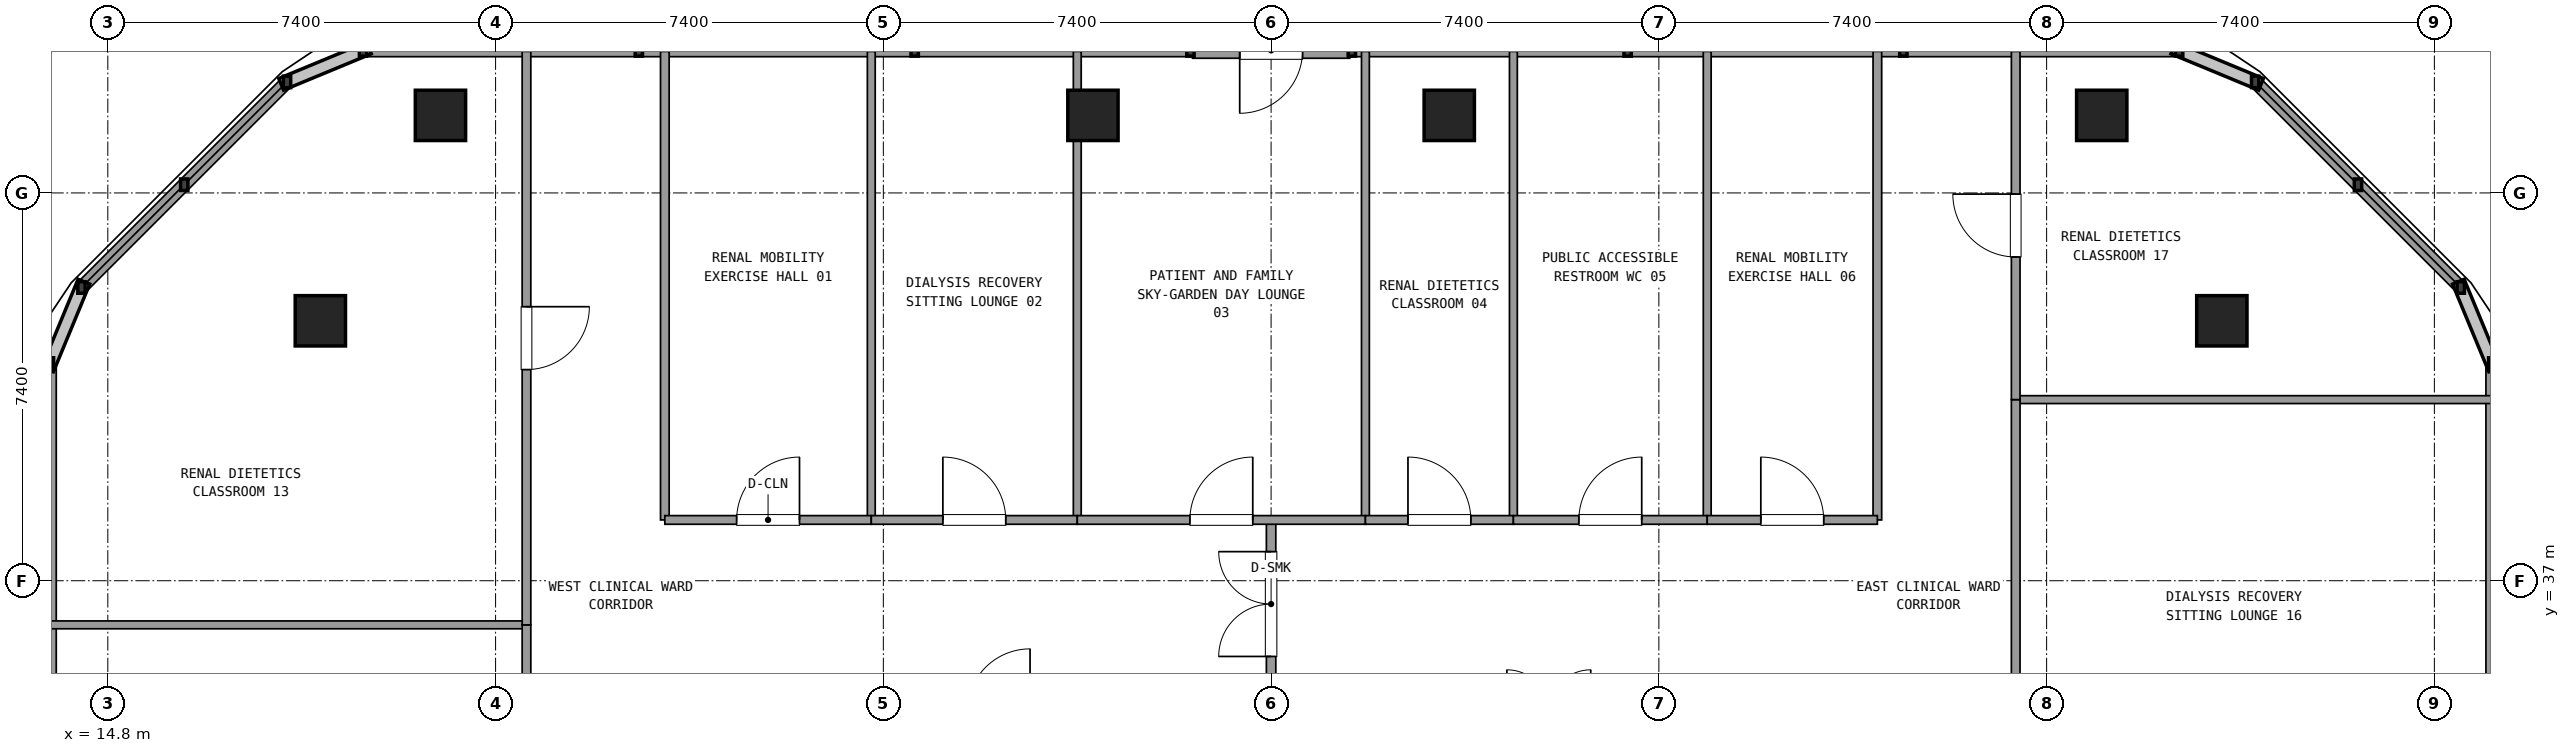
"""IFC4 building model, lengths in metres.
Left out: names, types, materials, properties, quantities, classifications, styles, units other than length and angle.
Written with IfcOpenShell. Run it as: python <this file> out.ifc"""

import sys

from ifc_helpers import new_model, si_unit, direction, frame, frame_2d, origin, origin_2d, place, context, subcontext, project, spatial, rectangle, extrude, element, fill, save


model = new_model("IFC4")
c1 = context("Model", 3, precision=1e-05, world=origin(), true_north=direction((0.0, 1.0)))
c2 = subcontext(c1, "Body", "Model", "MODEL_VIEW")
j1 = project(units=[si_unit("LENGTHUNIT", "METRE"), si_unit("PLANEANGLEUNIT", "RADIAN")], contexts=[c1])
p1 = place(None, origin())
s1 = spatial("IfcSite", under=j1, at=p1, CompositionType="ELEMENT")
p2 = place(p1, origin())
s2 = spatial("IfcBuilding", under=s1, at=p2, CompositionType="ELEMENT")
p3 = place(p2, frame((0.0, 0.0, 152.82)))
s3 = spatial("IfcBuildingStorey", under=s2, at=p3, CompositionType="ELEMENT", Elevation=152.82)
for number, where, z_axis, x_axis in (
    (1, (55.144, 41.96, 0.0), (0.0, 0.0, 1.0), (1.0, 0.0, 0.0)),
    (2, (52.852, 45.88, 0.0), (0.0, 0.0, 1.0), (1.0, 0.0, 0.0)),
    (3, (40.4, 45.88, 0.0), (0.0, 0.0, 1.0), (1.0, 0.0, 0.0)),
    (4, (33.6, 45.88, 0.0), (0.0, 0.0, 1.0), (1.0, 0.0, 0.0)),
    (5, (21.148, 45.88, 0.0), (0.0, 0.0, 1.0), (1.0, 0.0, 0.0)),
    (6, (18.856, 41.96, 0.0), (0.0, 0.0, 1.0), (1.0, 0.0, 0.0)),
):
    element("IfcColumn", number, at=place(p3, frame(where, z_axis=z_axis, x_axis=x_axis)), inside=s3, PredefinedType="COLUMN", context=c2, shape_type="SweptSolid", body=[
        extrude(rectangle(XDim=0.96, YDim=0.96, at=origin_2d()), origin(), (0.0, 0.0, 1.0), 3.6),
    ])
p4 = place(p3, frame((60.304, 10.655, 0.0), z_axis=(0.0, 0.0, 1.0), x_axis=(0.0, 1.0, 0.0)))
e7 = element("IfcWall", 7, at=p4, inside=s3, PredefinedType="SOLIDWALL", context=c2, shape_type="SweptSolid", body=[
    extrude(rectangle(XDim=30.49, YDim=0.24, at=frame_2d((15.245, 0.0))), origin(), (0.0, 0.0, 1.0), 0.85),
])
p5 = place(p3, frame((59.703, 42.596, 0.0), z_axis=(0.0, 0.0, 1.0), x_axis=(-0.707084777957, 0.707128783731, 0.0)))
e8 = element("IfcWall", 8, at=p5, inside=s3, PredefinedType="SOLIDWALL", context=c2, shape_type="SweptSolid", body=[
    extrude(rectangle(XDim=5.548, YDim=0.24, at=frame_2d((2.774, 0.0))), origin(), (0.0, 0.0, 1.0), 0.85),
])
p6 = place(p3, frame((38.501, 47.12, 0.0), z_axis=(0.0, 0.0, 1.0), x_axis=(-1.0, 0.0, 0.0)))
e9 = element("IfcWall", 9, at=p6, inside=s3, PredefinedType="SOLIDWALL", context=c2, shape_type="SweptSolid", body=[
    extrude(rectangle(XDim=3.0, YDim=0.3, at=frame_2d((1.5, 0.0))), origin(), (0.0, 0.0, 1.0), 2.67),
])
p7 = place(p6, frame((0.9, 0.0, 0.0)))
e10 = element("IfcOpeningElement", 10, at=p7, cuts=e9, PredefinedType="OPENING", context=c2, shape_type="SweptSolid", body=[
    extrude(rectangle(XDim=1.2, YDim=2.2, at=frame_2d((0.6, 1.1))), frame((0.0, 0.16, 0.0), z_axis=(0.0, -1.0, 0.0), x_axis=(1.0, 0.0, 0.0)), (0.0, 0.0, 1.0), 0.32),
])
p8 = place(p3, frame((54.329, 47.12, 0.0), z_axis=(0.0, 0.0, 1.0), x_axis=(-1.0, 0.0, 0.0)))
e11 = element("IfcWall", 11, at=p8, inside=s3, PredefinedType="SOLIDWALL", context=c2, shape_type="SweptSolid", body=[
    extrude(rectangle(XDim=15.788, YDim=0.24, at=frame_2d((7.894, 0.0))), origin(), (0.0, 0.0, 1.0), 0.85),
])
p9 = place(p3, frame((35.461, 47.12, 0.0), z_axis=(0.0, 0.0, 1.0), x_axis=(-1.0, 0.0, 0.0)))
e12 = element("IfcWall", 12, at=p9, inside=s3, PredefinedType="SOLIDWALL", context=c2, shape_type="SweptSolid", body=[
    extrude(rectangle(XDim=15.79, YDim=0.24, at=frame_2d((7.895, 0.0))), origin(), (0.0, 0.0, 1.0), 0.85),
])
p10 = place(p3, frame((18.22, 46.519, 0.0), z_axis=(0.0, 0.0, 1.0), x_axis=(-0.707084777957, -0.707128783731, 0.0)))
e13 = element("IfcWall", 13, at=p10, inside=s3, PredefinedType="SOLIDWALL", context=c2, shape_type="SweptSolid", body=[
    extrude(rectangle(XDim=5.548, YDim=0.24, at=frame_2d((2.774, 0.0))), origin(), (0.0, 0.0, 1.0), 0.85),
])
p11 = place(p3, frame((13.696, 41.145, 0.0), z_axis=(0.0, 0.0, 1.0), x_axis=(0.0, -1.0, 0.0)))
e14 = element("IfcWall", 14, at=p11, inside=s3, PredefinedType="SOLIDWALL", context=c2, shape_type="SweptSolid", body=[
    extrude(rectangle(XDim=30.49, YDim=0.24, at=frame_2d((15.245, 0.0))), origin(), (0.0, 0.0, 1.0), 0.85),
])
p12 = place(p3, frame((37.0, 34.95, 0.0), z_axis=(0.0, 0.0, 1.0), x_axis=(0.0, 1.0, 0.0)))
e15 = element("IfcWall", 15, at=p12, inside=s3, PredefinedType="PARTITIONING", context=c2, shape_type="SweptSolid", body=[
    extrude(rectangle(XDim=3.21, YDim=0.18, at=frame_2d((1.605, 0.0))), origin(), (0.0, 0.0, 1.0), 2.61),
])
p13 = place(p12, frame((0.605, 0.0, 0.0)))
e16 = element("IfcOpeningElement", 16, at=p13, cuts=e15, PredefinedType="OPENING", context=c2, shape_type="SweptSolid", body=[
    extrude(rectangle(XDim=2.0, YDim=2.2, at=frame_2d((1.0, 1.1))), frame((0.0, 0.1, 0.0), z_axis=(0.0, -1.0, 0.0), x_axis=(1.0, 0.0, 0.0)), (0.0, 0.0, 1.0), 0.2),
])
for number, where, z_axis, x_axis in (
    (17, (25.43, 38.16, 0.0), (0.0, 0.0, 1.0), (0.0, 1.0, 0.0)),
    (18, (48.57, 38.16, 0.0), (0.0, 0.0, 1.0), (0.0, 1.0, 0.0)),
):
    element("IfcWall", number, at=place(p3, frame(where, z_axis=z_axis, x_axis=x_axis)), inside=s3, PredefinedType="PARTITIONING", context=c2, shape_type="SweptSolid", body=[
        extrude(rectangle(XDim=8.94, YDim=0.165, at=frame_2d((4.47, 0.0))), origin(), (0.0, 0.0, 1.0), 2.61),
    ])
p14 = place(p3, frame((29.37, 38.16, 0.0), z_axis=(0.0, 0.0, 1.0), x_axis=(0.0, 1.0, 0.0)))
e19 = element("IfcWall", 19, at=p14, inside=s3, PredefinedType="PARTITIONING", context=c2, shape_type="SweptSolid", body=[
    extrude(rectangle(XDim=8.94, YDim=0.15, at=frame_2d((4.47, 0.0))), origin(), (0.0, 0.0, 1.0), 2.61),
])
p15 = place(p3, frame((25.43, 38.16, 0.0), z_axis=(0.0, 0.0, 1.0), x_axis=(1.0, 0.0, 0.0)))
e20 = element("IfcWall", 20, at=p15, inside=s3, PredefinedType="PARTITIONING", context=c2, shape_type="SweptSolid", body=[
    extrude(rectangle(XDim=3.94, YDim=0.165, at=frame_2d((1.97, 0.0))), origin(), (0.0, 0.0, 1.0), 2.61),
])
p16 = place(p15, frame((1.37, 0.0, 0.0)))
e21 = element("IfcOpeningElement", 21, at=p16, cuts=e20, PredefinedType="OPENING", context=c2, shape_type="SweptSolid", body=[
    extrude(rectangle(XDim=1.2, YDim=2.15, at=frame_2d((0.6, 1.075))), frame((0.0, 0.093, 0.0), z_axis=(0.0, -1.0, 0.0), x_axis=(1.0, 0.0, 0.0)), (0.0, 0.0, 1.0), 0.185),
])
p17 = place(p3, frame((33.301, 38.16, 0.0), z_axis=(0.0, 0.0, 1.0), x_axis=(0.0, 1.0, 0.0)))
e22 = element("IfcWall", 22, at=p17, inside=s3, PredefinedType="PARTITIONING", context=c2, shape_type="SweptSolid", body=[
    extrude(rectangle(XDim=8.94, YDim=0.15, at=frame_2d((4.47, 0.0))), origin(), (0.0, 0.0, 1.0), 2.61),
])
p18 = place(p3, frame((29.37, 38.16, 0.0), z_axis=(0.0, 0.0, 1.0), x_axis=(1.0, 0.0, 0.0)))
e23 = element("IfcWall", 23, at=p18, inside=s3, PredefinedType="PARTITIONING", context=c2, shape_type="SweptSolid", body=[
    extrude(rectangle(XDim=3.931, YDim=0.165, at=frame_2d((1.965, 0.0))), origin(), (0.0, 0.0, 1.0), 2.61),
])
p19 = place(p18, frame((1.366, 0.0, 0.0)))
e24 = element("IfcOpeningElement", 24, at=p19, cuts=e23, PredefinedType="OPENING", context=c2, shape_type="SweptSolid", body=[
    extrude(rectangle(XDim=1.2, YDim=2.15, at=frame_2d((0.6, 1.075))), frame((0.0, 0.093, 0.0), z_axis=(0.0, -1.0, 0.0), x_axis=(1.0, 0.0, 0.0)), (0.0, 0.0, 1.0), 0.185),
])
p20 = place(p3, frame((38.8, 38.16, 0.0), z_axis=(0.0, 0.0, 1.0), x_axis=(0.0, 1.0, 0.0)))
e25 = element("IfcWall", 25, at=p20, inside=s3, PredefinedType="PARTITIONING", context=c2, shape_type="SweptSolid", body=[
    extrude(rectangle(XDim=8.94, YDim=0.15, at=frame_2d((4.47, 0.0))), origin(), (0.0, 0.0, 1.0), 2.61),
])
p21 = place(p3, frame((33.301, 38.16, 0.0), z_axis=(0.0, 0.0, 1.0), x_axis=(1.0, 0.0, 0.0)))
e26 = element("IfcWall", 26, at=p21, inside=s3, PredefinedType="PARTITIONING", context=c2, shape_type="SweptSolid", body=[
    extrude(rectangle(XDim=5.499, YDim=0.165, at=frame_2d((2.75, 0.0))), origin(), (0.0, 0.0, 1.0), 2.61),
])
p22 = place(p21, frame((2.149, 0.0, 0.0)))
e27 = element("IfcOpeningElement", 27, at=p22, cuts=e26, PredefinedType="OPENING", context=c2, shape_type="SweptSolid", body=[
    extrude(rectangle(XDim=1.2, YDim=2.15, at=frame_2d((0.6, 1.075))), frame((0.0, 0.093, 0.0), z_axis=(0.0, -1.0, 0.0), x_axis=(1.0, 0.0, 0.0)), (0.0, 0.0, 1.0), 0.185),
])
p23 = place(p3, frame((41.624, 38.16, 0.0), z_axis=(0.0, 0.0, 1.0), x_axis=(0.0, 1.0, 0.0)))
e28 = element("IfcWall", 28, at=p23, inside=s3, PredefinedType="PARTITIONING", context=c2, shape_type="SweptSolid", body=[
    extrude(rectangle(XDim=8.94, YDim=0.15, at=frame_2d((4.47, 0.0))), origin(), (0.0, 0.0, 1.0), 2.61),
])
p24 = place(p3, frame((38.8, 38.16, 0.0), z_axis=(0.0, 0.0, 1.0), x_axis=(1.0, 0.0, 0.0)))
e29 = element("IfcWall", 29, at=p24, inside=s3, PredefinedType="PARTITIONING", context=c2, shape_type="SweptSolid", body=[
    extrude(rectangle(XDim=2.824, YDim=0.165, at=frame_2d((1.412, 0.0))), origin(), (0.0, 0.0, 1.0), 2.61),
])
p25 = place(p24, frame((0.812, 0.0, 0.0)))
e30 = element("IfcOpeningElement", 30, at=p25, cuts=e29, PredefinedType="OPENING", context=c2, shape_type="SweptSolid", body=[
    extrude(rectangle(XDim=1.2, YDim=2.15, at=frame_2d((0.6, 1.075))), frame((0.0, 0.093, 0.0), z_axis=(0.0, -1.0, 0.0), x_axis=(1.0, 0.0, 0.0)), (0.0, 0.0, 1.0), 0.185),
])
p26 = place(p3, frame((45.323, 38.16, 0.0), z_axis=(0.0, 0.0, 1.0), x_axis=(0.0, 1.0, 0.0)))
e31 = element("IfcWall", 31, at=p26, inside=s3, PredefinedType="PARTITIONING", context=c2, shape_type="SweptSolid", body=[
    extrude(rectangle(XDim=8.94, YDim=0.15, at=frame_2d((4.47, 0.0))), origin(), (0.0, 0.0, 1.0), 2.61),
])
p27 = place(p3, frame((41.624, 38.16, 0.0), z_axis=(0.0, 0.0, 1.0), x_axis=(1.0, 0.0, 0.0)))
e32 = element("IfcWall", 32, at=p27, inside=s3, PredefinedType="PARTITIONING", context=c2, shape_type="SweptSolid", body=[
    extrude(rectangle(XDim=3.699, YDim=0.165, at=frame_2d((1.85, 0.0))), origin(), (0.0, 0.0, 1.0), 2.61),
])
p28 = place(p27, frame((1.249, 0.0, 0.0)))
e33 = element("IfcOpeningElement", 33, at=p28, cuts=e32, PredefinedType="OPENING", context=c2, shape_type="SweptSolid", body=[
    extrude(rectangle(XDim=1.2, YDim=2.15, at=frame_2d((0.6, 1.075))), frame((0.0, 0.093, 0.0), z_axis=(0.0, -1.0, 0.0), x_axis=(1.0, 0.0, 0.0)), (0.0, 0.0, 1.0), 0.185),
])
p29 = place(p3, frame((45.323, 38.16, 0.0), z_axis=(0.0, 0.0, 1.0), x_axis=(1.0, 0.0, 0.0)))
e34 = element("IfcWall", 34, at=p29, inside=s3, PredefinedType="PARTITIONING", context=c2, shape_type="SweptSolid", body=[
    extrude(rectangle(XDim=3.247, YDim=0.165, at=frame_2d((1.624, 0.0))), origin(), (0.0, 0.0, 1.0), 2.61),
])
p30 = place(p29, frame((1.023, 0.0, 0.0)))
e35 = element("IfcOpeningElement", 35, at=p30, cuts=e34, PredefinedType="OPENING", context=c2, shape_type="SweptSolid", body=[
    extrude(rectangle(XDim=1.2, YDim=2.15, at=frame_2d((0.6, 1.075))), frame((0.0, 0.093, 0.0), z_axis=(0.0, -1.0, 0.0), x_axis=(1.0, 0.0, 0.0)), (0.0, 0.0, 1.0), 0.185),
])
p31 = place(p3, frame((22.79, 36.158, 0.0), z_axis=(0.0, 0.0, 1.0), x_axis=(-1.0, 0.0, 0.0)))
e36 = element("IfcWall", 36, at=p31, inside=s3, PredefinedType="PARTITIONING", context=c2, shape_type="SweptSolid", body=[
    extrude(rectangle(XDim=9.074, YDim=0.15, at=frame_2d((4.537, 0.0))), origin(), (0.0, 0.0, 1.0), 2.61),
])
p32 = place(p3, frame((22.79, 27.56, 0.0), z_axis=(0.0, 0.0, 1.0), x_axis=(0.0, 1.0, 0.0)))
e37 = element("IfcWall", 37, at=p32, inside=s3, PredefinedType="PARTITIONING", context=c2, shape_type="SweptSolid", body=[
    extrude(rectangle(XDim=8.598, YDim=0.165, at=frame_2d((4.299, 0.0))), origin(), (0.0, 0.0, 1.0), 2.61),
])
p33 = place(p32, frame((3.699, 0.0, 0.0)))
e38 = element("IfcOpeningElement", 38, at=p33, cuts=e37, PredefinedType="OPENING", context=c2, shape_type="SweptSolid", body=[
    extrude(rectangle(XDim=1.2, YDim=2.15, at=frame_2d((0.6, 1.075))), frame((0.0, 0.093, 0.0), z_axis=(0.0, -1.0, 0.0), x_axis=(1.0, 0.0, 0.0)), (0.0, 0.0, 1.0), 0.185),
])
p34 = place(p3, frame((22.79, 36.158, 0.0), z_axis=(0.0, 0.0, 1.0), x_axis=(0.0, 1.0, 0.0)))
e39 = element("IfcWall", 39, at=p34, inside=s3, PredefinedType="PARTITIONING", context=c2, shape_type="SweptSolid", body=[
    extrude(rectangle(XDim=10.942, YDim=0.165, at=frame_2d((5.471, 0.0))), origin(), (0.0, 0.0, 1.0), 2.61),
])
p35 = place(p34, frame((4.871, 0.0, 0.0)))
e40 = element("IfcOpeningElement", 40, at=p35, cuts=e39, PredefinedType="OPENING", context=c2, shape_type="SweptSolid", body=[
    extrude(rectangle(XDim=1.2, YDim=2.15, at=frame_2d((0.6, 1.075))), frame((0.0, 0.093, 0.0), z_axis=(0.0, -1.0, 0.0), x_axis=(1.0, 0.0, 0.0)), (0.0, 0.0, 1.0), 0.185),
])
p36 = place(p3, frame((51.21, 40.456, 0.0), z_axis=(0.0, 0.0, 1.0), x_axis=(1.0, 0.0, 0.0)))
e41 = element("IfcWall", 41, at=p36, inside=s3, PredefinedType="PARTITIONING", context=c2, shape_type="SweptSolid", body=[
    extrude(rectangle(XDim=9.074, YDim=0.15, at=frame_2d((4.537, 0.0))), origin(), (0.0, 0.0, 1.0), 2.61),
])
p37 = place(p3, frame((51.21, 27.56, 0.0), z_axis=(0.0, 0.0, 1.0), x_axis=(0.0, 1.0, 0.0)))
e42 = element("IfcWall", 42, at=p37, inside=s3, PredefinedType="PARTITIONING", context=c2, shape_type="SweptSolid", body=[
    extrude(rectangle(XDim=12.896, YDim=0.165, at=frame_2d((6.448, 0.0))), origin(), (0.0, 0.0, 1.0), 2.61),
])
p38 = place(p37, frame((5.848, 0.0, 0.0)))
e43 = element("IfcOpeningElement", 43, at=p38, cuts=e42, PredefinedType="OPENING", context=c2, shape_type="SweptSolid", body=[
    extrude(rectangle(XDim=1.2, YDim=2.15, at=frame_2d((0.6, 1.075))), frame((0.0, 0.093, 0.0), z_axis=(0.0, -1.0, 0.0), x_axis=(1.0, 0.0, 0.0)), (0.0, 0.0, 1.0), 0.185),
])
p39 = place(p3, frame((51.21, 40.456, 0.0), z_axis=(0.0, 0.0, 1.0), x_axis=(0.0, 1.0, 0.0)))
e44 = element("IfcWall", 44, at=p39, inside=s3, PredefinedType="PARTITIONING", context=c2, shape_type="SweptSolid", body=[
    extrude(rectangle(XDim=6.644, YDim=0.165, at=frame_2d((3.322, 0.0))), origin(), (0.0, 0.0, 1.0), 2.61),
])
p40 = place(p39, frame((2.722, 0.0, 0.0)))
e45 = element("IfcOpeningElement", 45, at=p40, cuts=e44, PredefinedType="OPENING", context=c2, shape_type="SweptSolid", body=[
    extrude(rectangle(XDim=1.2, YDim=2.15, at=frame_2d((0.6, 1.075))), frame((0.0, 0.093, 0.0), z_axis=(0.0, -1.0, 0.0), x_axis=(1.0, 0.0, 0.0)), (0.0, 0.0, 1.0), 0.185),
])
p41 = place(p13, origin())
e46 = element("IfcDoor", 46, at=p41, inside=s3, OperationType="DOUBLE_DOOR_SINGLE_SWING", PredefinedType="DOOR", context=c2, shape_type="SweptSolid", body=[
    extrude(rectangle(XDim=2.0, YDim=2.2, at=frame_2d((1.0, 1.1))), frame((0.0, 0.025, 0.0), z_axis=(0.0, -1.0, 0.0), x_axis=(1.0, 0.0, 0.0)), (0.0, 0.0, 1.0), 0.05),
])
fill(e16, e46)
p42 = place(p16, origin())
e47 = element("IfcDoor", 47, at=p42, inside=s3, OperationType="SINGLE_SWING_RIGHT", PredefinedType="DOOR", context=c2, shape_type="SweptSolid", body=[
    extrude(rectangle(XDim=1.2, YDim=2.15, at=frame_2d((0.6, 1.075))), frame((0.0, 0.025, 0.0), z_axis=(0.0, -1.0, 0.0), x_axis=(1.0, 0.0, 0.0)), (0.0, 0.0, 1.0), 0.05),
])
fill(e21, e47)
p43 = place(p19, origin())
e48 = element("IfcDoor", 48, at=p43, inside=s3, OperationType="SINGLE_SWING_LEFT", PredefinedType="DOOR", context=c2, shape_type="SweptSolid", body=[
    extrude(rectangle(XDim=1.2, YDim=2.15, at=frame_2d((0.6, 1.075))), frame((0.0, 0.025, 0.0), z_axis=(0.0, -1.0, 0.0), x_axis=(1.0, 0.0, 0.0)), (0.0, 0.0, 1.0), 0.05),
])
fill(e24, e48)
p44 = place(p22, origin())
e49 = element("IfcDoor", 49, at=p44, inside=s3, OperationType="SINGLE_SWING_RIGHT", PredefinedType="DOOR", context=c2, shape_type="SweptSolid", body=[
    extrude(rectangle(XDim=1.2, YDim=2.15, at=frame_2d((0.6, 1.075))), frame((0.0, 0.025, 0.0), z_axis=(0.0, -1.0, 0.0), x_axis=(1.0, 0.0, 0.0)), (0.0, 0.0, 1.0), 0.05),
])
fill(e27, e49)
p45 = place(p25, origin())
e50 = element("IfcDoor", 50, at=p45, inside=s3, OperationType="SINGLE_SWING_LEFT", PredefinedType="DOOR", context=c2, shape_type="SweptSolid", body=[
    extrude(rectangle(XDim=1.2, YDim=2.15, at=frame_2d((0.6, 1.075))), frame((0.0, 0.025, 0.0), z_axis=(0.0, -1.0, 0.0), x_axis=(1.0, 0.0, 0.0)), (0.0, 0.0, 1.0), 0.05),
])
fill(e30, e50)
p46 = place(p28, origin())
e51 = element("IfcDoor", 51, at=p46, inside=s3, OperationType="SINGLE_SWING_RIGHT", PredefinedType="DOOR", context=c2, shape_type="SweptSolid", body=[
    extrude(rectangle(XDim=1.2, YDim=2.15, at=frame_2d((0.6, 1.075))), frame((0.0, 0.025, 0.0), z_axis=(0.0, -1.0, 0.0), x_axis=(1.0, 0.0, 0.0)), (0.0, 0.0, 1.0), 0.05),
])
fill(e33, e51)
p47 = place(p30, origin())
e52 = element("IfcDoor", 52, at=p47, inside=s3, OperationType="SINGLE_SWING_LEFT", PredefinedType="DOOR", context=c2, shape_type="SweptSolid", body=[
    extrude(rectangle(XDim=1.2, YDim=2.15, at=frame_2d((0.6, 1.075))), frame((0.0, 0.025, 0.0), z_axis=(0.0, -1.0, 0.0), x_axis=(1.0, 0.0, 0.0)), (0.0, 0.0, 1.0), 0.05),
])
fill(e35, e52)
p48 = place(p35, frame((1.2, 0.0, 0.0), z_axis=(0.0, 0.0, 1.0), x_axis=(-1.0, 0.0, 0.0)))
e53 = element("IfcDoor", 53, at=p48, inside=s3, OperationType="SINGLE_SWING_RIGHT", PredefinedType="DOOR", context=c2, shape_type="SweptSolid", body=[
    extrude(rectangle(XDim=1.2, YDim=2.15, at=frame_2d((0.6, 1.075))), frame((0.0, 0.025, 0.0), z_axis=(0.0, -1.0, 0.0), x_axis=(1.0, 0.0, 0.0)), (0.0, 0.0, 1.0), 0.05),
])
fill(e40, e53)
p49 = place(p40, origin())
e54 = element("IfcDoor", 54, at=p49, inside=s3, OperationType="SINGLE_SWING_RIGHT", PredefinedType="DOOR", context=c2, shape_type="SweptSolid", body=[
    extrude(rectangle(XDim=1.2, YDim=2.15, at=frame_2d((0.6, 1.075))), frame((0.0, 0.025, 0.0), z_axis=(0.0, -1.0, 0.0), x_axis=(1.0, 0.0, 0.0)), (0.0, 0.0, 1.0), 0.05),
])
fill(e45, e54)
save(model, sys.argv[1])
